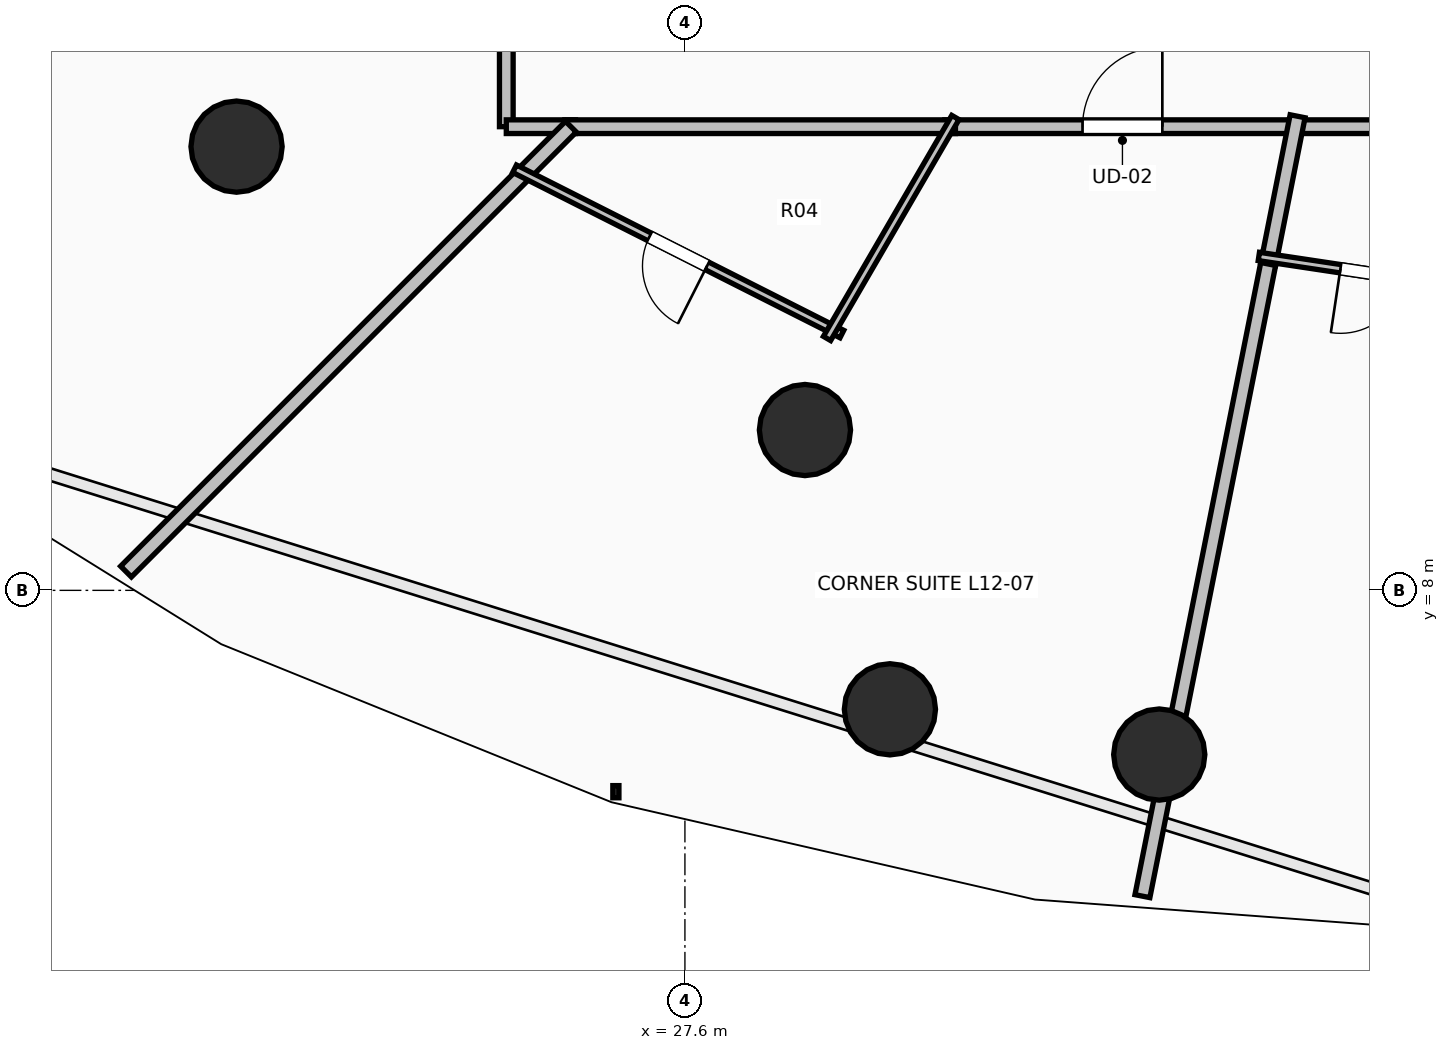
"""IFC4 building model, lengths in metres.
Left out: names, types, materials, properties, quantities, classifications, styles, units other than length and angle.
Written with IfcOpenShell. Run it as: python <this file> out.ifc"""

import sys

from ifc_helpers import new_model, si_unit, direction, frame, frame_2d, origin, origin_2d, place, context, subcontext, project, spatial, rectangle, circle, extrude, element, fill, save


model = new_model("IFC4")
c1 = context("Model", 3, precision=1e-05, world=origin(), true_north=direction((0.0, 1.0)))
c2 = subcontext(c1, "Body", "Model", "MODEL_VIEW")
j1 = project(units=[si_unit("LENGTHUNIT", "METRE"), si_unit("PLANEANGLEUNIT", "RADIAN")], contexts=[c1])
p1 = place(None, origin())
s1 = spatial("IfcSite", under=j1, at=p1, CompositionType="ELEMENT")
p2 = place(p1, origin())
s2 = spatial("IfcBuilding", under=s1, at=p2, CompositionType="ELEMENT")
p3 = place(p2, frame((0.0, 0.0, 48.5)))
s3 = spatial("IfcBuildingStorey", under=s2, at=p3, CompositionType="ELEMENT", Elevation=48.5)
for number, where, z_axis, x_axis in (
    (1, (21.701, 13.838, 0.0), (0.0, 0.0, 1.0), (-0.707, -0.707, 0.0)),
    (2, (29.179, 10.109, 0.0), (0.0, 0.0, 1.0), (-0.383, -0.924, 0.0)),
    (3, (30.297, 6.435, 0.0), (0.0, 0.0, 1.0), (-0.383, -0.924, 0.0)),
    (4, (33.84, 5.84, 0.0), (0.0, 0.0, 1.0), (0.0, -1.0, 0.0)),
):
    element("IfcColumn", number, at=place(p3, frame(where, z_axis=z_axis, x_axis=x_axis)), inside=s3, PredefinedType="COLUMN", context=c2, shape_type="SweptSolid", body=[
        extrude(circle(Radius=0.6, at=origin_2d()), origin(), (0.0, 0.0, 1.0), 3.5),
    ])
p4 = place(p3, frame((25.25, 19.814, 0.0), z_axis=(0.0, 0.0, 1.0), x_axis=(0.0, -1.0, 0.0)))
e5 = element("IfcWall", 5, at=p4, inside=s3, PredefinedType="PARTITIONING", context=c2, shape_type="SweptSolid", body=[
    extrude(rectangle(XDim=5.714, YDim=0.18, at=frame_2d((2.857, 0.0))), origin(), (0.0, 0.0, 1.0), 2.432),
])
p5 = place(p4, frame((2.332, 0.0, 0.0)))
e6 = element("IfcOpeningElement", 6, at=p5, cuts=e5, PredefinedType="OPENING", context=c2, shape_type="SweptSolid", body=[
    extrude(rectangle(XDim=1.05, YDim=2.2, at=frame_2d((0.525, 1.1))), frame((0.0, 0.105, 0.0), z_axis=(0.0, -1.0, 0.0), x_axis=(1.0, 0.0, 0.0)), (0.0, 0.0, 1.0), 0.21),
])
p6 = place(p3, frame((25.25, 14.1, 0.0), z_axis=(0.0, 0.0, 1.0), x_axis=(1.0, 0.0, 0.0)))
e7 = element("IfcWall", 7, at=p6, inside=s3, PredefinedType="PARTITIONING", context=c2, shape_type="SweptSolid", body=[
    extrude(rectangle(XDim=0.91, YDim=0.18, at=frame_2d((0.455, 0.0))), origin(), (0.0, 0.0, 1.0), 2.886),
])
p7 = place(p3, frame((31.019, 14.1, 0.0), z_axis=(0.0, 0.0, 1.0), x_axis=(1.0, 0.0, 0.0)))
e8 = element("IfcWall", 8, at=p7, inside=s3, PredefinedType="PARTITIONING", context=c2, shape_type="SweptSolid", body=[
    extrude(rectangle(XDim=4.674, YDim=0.18, at=frame_2d((2.337, 0.0))), origin(), (0.0, 0.0, 1.0), 3.24),
])
p8 = place(p7, frame((1.812, 0.0, 0.0)))
e9 = element("IfcOpeningElement", 9, at=p8, cuts=e8, PredefinedType="OPENING", context=c2, shape_type="SweptSolid", body=[
    extrude(rectangle(XDim=1.05, YDim=2.2, at=frame_2d((0.525, 1.1))), frame((0.0, 0.105, 0.0), z_axis=(0.0, -1.0, 0.0), x_axis=(1.0, 0.0, 0.0)), (0.0, 0.0, 1.0), 0.21),
])
p9 = place(p3, frame((26.02, 14.1, 0.0), z_axis=(0.0, 0.0, 1.0), x_axis=(1.0, 0.0, 0.0)))
e10 = element("IfcWall", 10, at=p9, inside=s3, PredefinedType="PARTITIONING", context=c2, shape_type="SweptSolid", body=[
    extrude(rectangle(XDim=5.139, YDim=0.18, at=frame_2d((2.569, 0.0))), origin(), (0.0, 0.0, 1.0), 2.432),
])
p10 = place(p3, frame((35.553, 14.1, 0.0), z_axis=(0.0, 0.0, 1.0), x_axis=(1.0, 0.0, 0.0)))
e11 = element("IfcWall", 11, at=p10, inside=s3, PredefinedType="PARTITIONING", context=c2, shape_type="SweptSolid", body=[
    extrude(rectangle(XDim=3.276, YDim=0.18, at=frame_2d((1.638, 0.0))), origin(), (0.0, 0.0, 1.0), 3.24),
])
p11 = place(p3, frame((20.247, 8.247, 0.0), z_axis=(0.0, 0.0, 1.0), x_axis=(0.707106781187, 0.707106781187, 0.0)))
e12 = element("IfcWall", 12, at=p11, inside=s3, PredefinedType="PARTITIONING", context=c2, shape_type="SweptSolid", body=[
    extrude(rectangle(XDim=8.277, YDim=0.2, at=frame_2d((4.139, 0.0))), origin(), (0.0, 0.0, 1.0), 2.624),
])
p12 = place(p3, frame((29.665, 11.372, 0.0), z_axis=(0.0, 0.0, 1.0), x_axis=(-0.892577568201, 0.450893873039, 0.0)))
e13 = element("IfcWall", 13, at=p12, inside=s3, PredefinedType="PARTITIONING", context=c2, shape_type="SweptSolid", body=[
    extrude(rectangle(XDim=4.824, YDim=0.11, at=frame_2d((2.412, 0.0))), origin(), (0.0, 0.0, 1.0), 2.432),
])
p13 = place(p12, frame((1.987, 0.0, 0.0)))
e14 = element("IfcOpeningElement", 14, at=p13, cuts=e13, PredefinedType="OPENING", context=c2, shape_type="SweptSolid", body=[
    extrude(rectangle(XDim=0.85, YDim=2.1, at=frame_2d((0.425, 1.05))), frame((0.0, 0.07, 0.0), z_axis=(0.0, -1.0, 0.0), x_axis=(1.0, 0.0, 0.0)), (0.0, 0.0, 1.0), 0.14),
])
p14 = place(p3, frame((31.158, 14.221, 0.0), z_axis=(0.0, 0.0, 1.0), x_axis=(-0.50222661214, -0.864736046466, 0.0)))
e15 = element("IfcWall", 15, at=p14, inside=s3, PredefinedType="PARTITIONING", context=c2, shape_type="SweptSolid", body=[
    extrude(rectangle(XDim=3.362, YDim=0.11, at=frame_2d((1.681, 0.0))), origin(), (0.0, 0.0, 1.0), 2.886),
])
p15 = place(p3, frame((33.619, 3.977, 0.0), z_axis=(0.0, 0.0, 1.0), x_axis=(0.195151937053, 0.980773022398, 0.0)))
e16 = element("IfcWall", 16, at=p15, inside=s3, PredefinedType="PARTITIONING", context=c2, shape_type="SweptSolid", body=[
    extrude(rectangle(XDim=8.62, YDim=0.2, at=frame_2d((4.31, 0.0))), origin(), (0.0, 0.0, 1.0), 2.432),
])
p16 = place(p3, frame((35.274, 12.294, 0.0), z_axis=(0.0, 0.0, 1.0), x_axis=(0.194907646023, 0.980821599233, 0.0)))
e17 = element("IfcWall", 17, at=p16, inside=s3, PredefinedType="PARTITIONING", context=c2, shape_type="SweptSolid", body=[
    extrude(rectangle(XDim=1.982, YDim=0.2, at=frame_2d((0.991, 0.0))), origin(), (0.0, 0.0, 1.0), 2.886),
])
p17 = place(p3, frame((38.138, 11.943, 0.0), z_axis=(0.0, 0.0, 1.0), x_axis=(-0.988861549405, 0.148838288446, 0.0)))
e18 = element("IfcWall", 18, at=p17, inside=s3, PredefinedType="PARTITIONING", context=c2, shape_type="SweptSolid", body=[
    extrude(rectangle(XDim=3.021, YDim=0.11, at=frame_2d((1.511, 0.0))), origin(), (0.0, 0.0, 1.0), 3.24),
])
p18 = place(p17, frame((1.086, 0.0, 0.0)))
e19 = element("IfcOpeningElement", 19, at=p18, cuts=e18, PredefinedType="OPENING", context=c2, shape_type="SweptSolid", body=[
    extrude(rectangle(XDim=0.85, YDim=2.1, at=frame_2d((0.425, 1.05))), frame((0.0, 0.07, 0.0), z_axis=(0.0, -1.0, 0.0), x_axis=(1.0, 0.0, 0.0)), (0.0, 0.0, 1.0), 0.14),
])
p19 = place(p8, origin())
e20 = element("IfcDoor", 20, at=p19, inside=s3, OperationType="SINGLE_SWING_RIGHT", PredefinedType="DOOR", context=c2, shape_type="SweptSolid", body=[
    extrude(rectangle(XDim=1.05, YDim=2.2, at=frame_2d((0.525, 1.1))), frame((0.0, 0.025, 0.0), z_axis=(0.0, -1.0, 0.0), x_axis=(1.0, 0.0, 0.0)), (0.0, 0.0, 1.0), 0.05),
])
fill(e9, e20)
p20 = place(p13, origin())
e21 = element("IfcDoor", 21, at=p20, inside=s3, OperationType="SINGLE_SWING_LEFT", PredefinedType="DOOR", context=c2, shape_type="SweptSolid", body=[
    extrude(rectangle(XDim=0.85, YDim=2.1, at=frame_2d((0.425, 1.05))), frame((0.0, 0.025, 0.0), z_axis=(0.0, -1.0, 0.0), x_axis=(1.0, 0.0, 0.0)), (0.0, 0.0, 1.0), 0.05),
])
fill(e14, e21)
p21 = place(p18, origin())
e22 = element("IfcDoor", 22, at=p21, inside=s3, OperationType="SINGLE_SWING_RIGHT", PredefinedType="DOOR", context=c2, shape_type="SweptSolid", body=[
    extrude(rectangle(XDim=0.85, YDim=2.1, at=frame_2d((0.425, 1.05))), frame((0.0, 0.025, 0.0), z_axis=(0.0, -1.0, 0.0), x_axis=(1.0, 0.0, 0.0)), (0.0, 0.0, 1.0), 0.05),
])
fill(e19, e22)
save(model, sys.argv[1])
